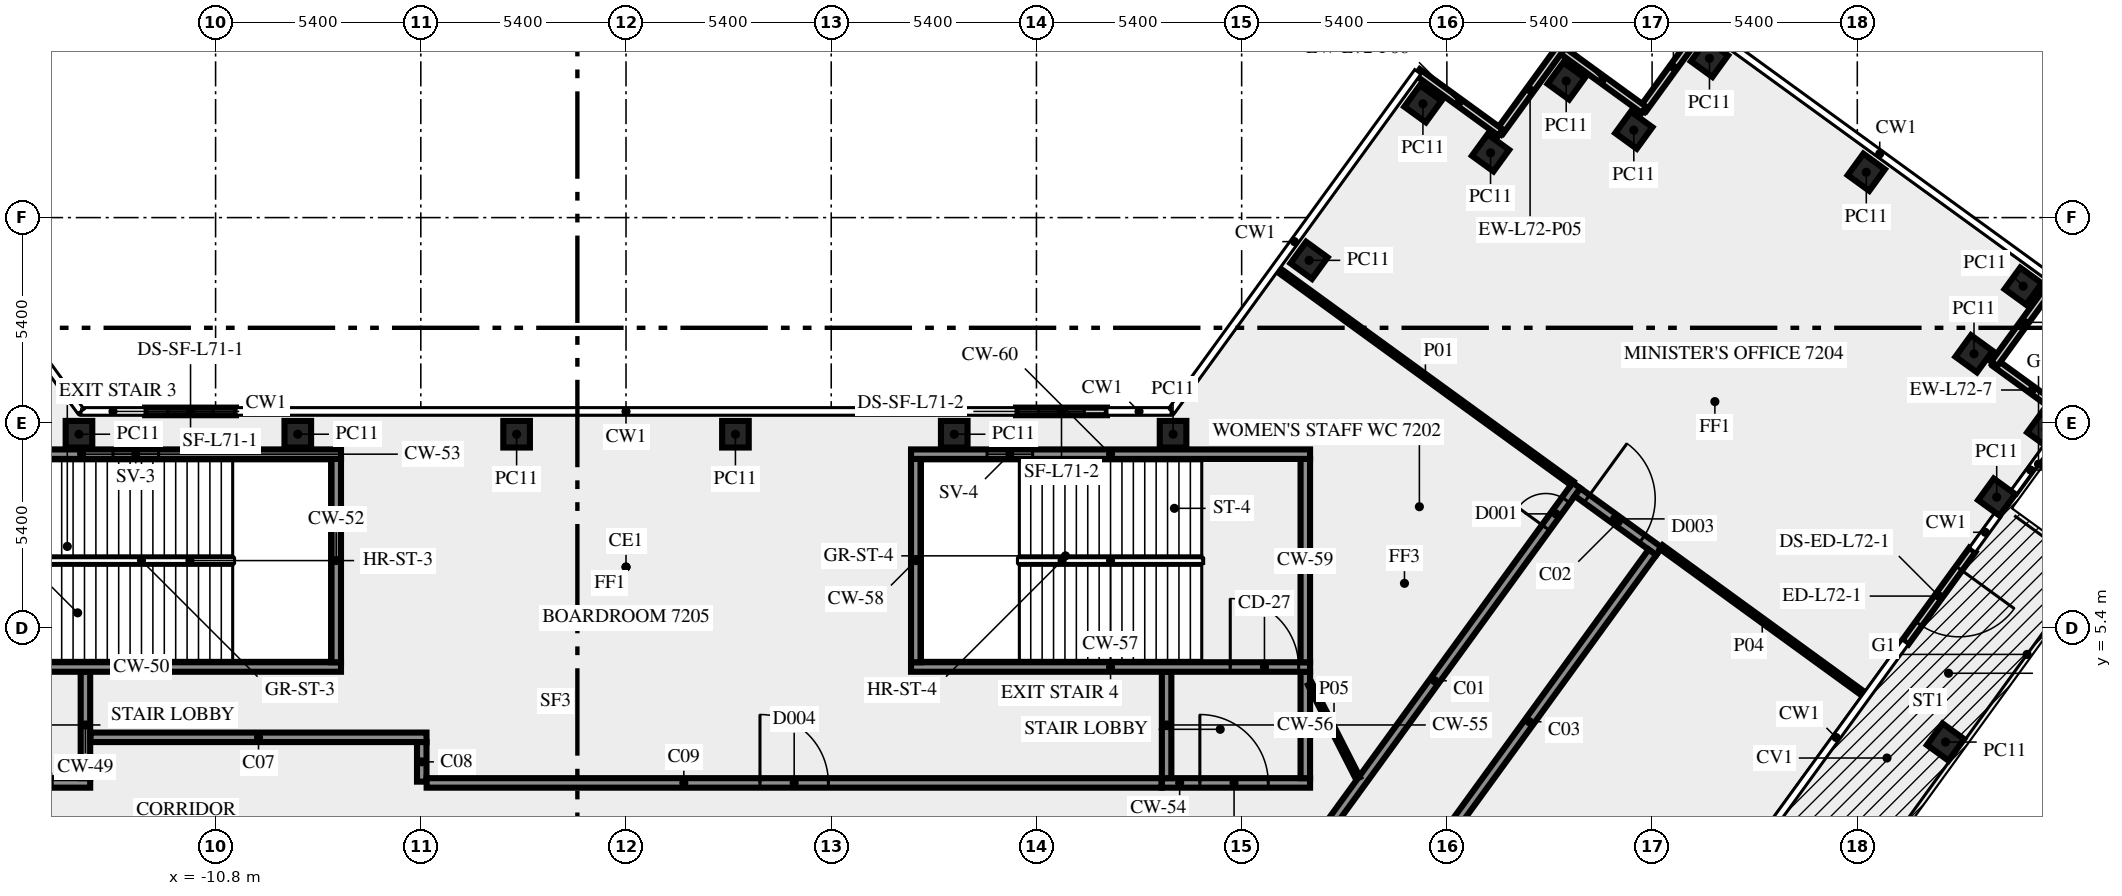
"""IFC4 building model, lengths in metres.
Left out: names, types, materials, properties, quantities, classifications, styles, units other than length and angle.
Written with IfcOpenShell. Run it as: python <this file> out.ifc"""

import sys

from ifc_helpers import new_model, si_unit, direction, frame, frame_2d, origin, origin_2d, place, context, subcontext, project, spatial, rectangle, extrude, element, fill, save


model = new_model("IFC4")
c1 = context("Model", 3, precision=1e-05, world=origin(), true_north=direction((0.0, 1.0)))
c2 = subcontext(c1, "Body", "Model", "MODEL_VIEW")
j1 = project(units=[si_unit("LENGTHUNIT", "METRE"), si_unit("PLANEANGLEUNIT", "RADIAN")], contexts=[c1])
p1 = place(None, origin())
s1 = spatial("IfcSite", under=j1, at=p1, CompositionType="ELEMENT")
p2 = place(p1, origin())
s2 = spatial("IfcBuilding", under=s1, at=p2, CompositionType="ELEMENT")
p3 = place(p2, frame((0.0, 0.0, 311.0)))
s3 = spatial("IfcBuildingStorey", under=s2, at=p3, CompositionType="ELEMENT", Elevation=311.0)
for number, where, z_axis, x_axis in (
    (1, (34.722, 2.4, 0.0), (0.0, 0.0, 1.0), (0.588, 0.809, 0.0)),
    (2, (36.068, 8.844, 0.0), (0.0, 0.0, 1.0), (0.588, 0.809, 0.0)),
    (3, (37.36, 10.625, 0.0), (0.0, 0.0, 1.0), (0.588, 0.809, 0.0)),
    (4, (35.471, 12.616, 0.0), (0.0, 0.0, 1.0), (-0.809, 0.588, 0.0)),
    (5, (36.765, 14.395, 0.0), (0.0, 0.0, 1.0), (-0.809, 0.588, 0.0)),
    (6, (32.637, 17.393, 0.0), (0.0, 0.0, 1.0), (-0.809, 0.588, 0.0)),
    (7, (28.51, 20.39, 0.0), (0.0, 0.0, 1.0), (-0.588, -0.809, 0.0)),
    (8, (26.519, 18.5, 0.0), (0.0, 0.0, 1.0), (-0.809, 0.588, 0.0)),
    (9, (24.74, 19.795, 0.0), (0.0, 0.0, 1.0), (-0.588, -0.809, 0.0)),
    (10, (22.749, 17.904, 0.0), (0.0, 0.0, 1.0), (-0.588, -0.809, 0.0)),
    (11, (20.97, 19.195, 0.0), (0.0, 0.0, 1.0), (-0.588, -0.809, 0.0)),
    (12, (17.974, 15.075, 0.0), (0.0, 0.0, 1.0), (-0.588, -0.809, 0.0)),
    (13, (14.395, 10.5, 0.0), (0.0, 0.0, 1.0), (-1.0, 0.0, 0.0)),
    (14, (8.637, 10.5, 0.0), (0.0, 0.0, 1.0), (-1.0, 0.0, 0.0)),
    (15, (2.879, 10.5, 0.0), (0.0, 0.0, 1.0), (-1.0, 0.0, 0.0)),
    (16, (-2.879, 10.5, 0.0), (0.0, 0.0, 1.0), (-1.0, 0.0, 0.0)),
    (17, (-8.637, 10.5, 0.0), (0.0, 0.0, 1.0), (-1.0, 0.0, 0.0)),
    (18, (-14.395, 10.5, 0.0), (0.0, 0.0, 1.0), (-1.0, 0.0, 0.0)),
):
    element("IfcColumn", number, at=place(p3, frame(where, z_axis=z_axis, x_axis=x_axis)), inside=s3, PredefinedType="COLUMN", context=c2, shape_type="SweptSolid", body=[
        extrude(rectangle(XDim=0.7, YDim=0.7, at=origin_2d()), origin(), (0.0, 0.0, 1.0), 3.65),
    ])
p4 = place(p3, frame((35.428, 7.455, 0.0), z_axis=(0.0, 0.0, 1.0), x_axis=(-0.587755461469, -0.809038637837, 0.0)))
e19 = element("IfcWall", 19, at=p4, inside=s3, PredefinedType="SOLIDWALL", context=c2, shape_type="SweptSolid", body=[
    extrude(rectangle(XDim=3.0, YDim=0.2, at=frame_2d((1.5, 0.0))), origin(), (0.0, 0.0, 1.0), 3.65),
])
p5 = place(p4, frame((0.6, 0.0, 0.0)))
e20 = element("IfcOpeningElement", 20, at=p5, cuts=e19, PredefinedType="OPENING", context=c2, shape_type="SweptSolid", body=[
    extrude(rectangle(XDim=1.8, YDim=2.4, at=frame_2d((0.9, 1.2))), frame((0.0, 0.11, 0.0), z_axis=(0.0, -1.0, 0.0), x_axis=(1.0, 0.0, 0.0)), (0.0, 0.0, 1.0), 0.22),
])
p6 = place(p3, frame((37.974, 10.958, 0.0), z_axis=(0.0, 0.0, 1.0), x_axis=(-0.809026317077, 0.587772420479, 0.0)))
e21 = element("IfcWall", 21, at=p6, inside=s3, PredefinedType="SOLIDWALL", context=c2, shape_type="SweptSolid", body=[
    extrude(rectangle(XDim=2.4, YDim=0.2, at=frame_2d((1.2, 0.0))), origin(), (0.0, 0.0, 1.0), 3.65),
])
p7 = place(p3, frame((36.005, 12.352, 0.0), z_axis=(0.0, 0.0, 1.0), x_axis=(0.587762999008, 0.809033161865, 0.0)))
e22 = element("IfcWall", 22, at=p7, inside=s3, PredefinedType="SOLIDWALL", context=c2, shape_type="SweptSolid", body=[
    extrude(rectangle(XDim=2.7, YDim=0.2, at=frame_2d((1.35, 0.0))), origin(), (0.0, 0.0, 1.0), 3.65),
])
for number, where, z_axis, x_axis in (
    (23, (28.354, 21.247, 0.0), (0.0, 0.0, 1.0), (-0.588, -0.809, 0.0)),
    (24, (26.785, 19.036, 0.0), (0.0, 0.0, 1.0), (-0.809, 0.588, 0.0)),
):
    element("IfcWall", number, at=place(p3, frame(where, z_axis=z_axis, x_axis=x_axis)), inside=s3, PredefinedType="SOLIDWALL", context=c2, shape_type="SweptSolid", body=[
        extrude(rectangle(XDim=2.7, YDim=0.2, at=frame_2d((1.35, 0.0))), origin(), (0.0, 0.0, 1.0), 3.65),
    ])
for number, where, z_axis, x_axis in (
    (25, (24.583, 20.65, 0.0), (0.0, 0.0, 1.0), (-0.588, -0.809, 0.0)),
    (26, (23.013, 18.438, 0.0), (0.0, 0.0, 1.0), (-0.809, 0.588, 0.0)),
):
    element("IfcWall", number, at=place(p3, frame(where, z_axis=z_axis, x_axis=x_axis)), inside=s3, PredefinedType="SOLIDWALL", context=c2, shape_type="SweptSolid", body=[
        extrude(rectangle(XDim=2.7, YDim=0.2, at=frame_2d((1.35, 0.0))), origin(), (0.0, 0.0, 1.0), 3.65),
    ])
p8 = place(p3, frame((12.655, 11.1, 0.0), z_axis=(0.0, 0.0, 1.0), x_axis=(-1.0, 0.0, 0.0)))
e27 = element("IfcWall", 27, at=p8, inside=s3, PredefinedType="SOLIDWALL", context=c2, shape_type="SweptSolid", body=[
    extrude(rectangle(XDim=2.392, YDim=0.2, at=frame_2d((1.196, 0.0))), origin(), (0.0, 0.0, 1.0), 3.65),
])
p9 = place(p8, frame((0.596, 0.0, 1.0)))
e28 = element("IfcOpeningElement", 28, at=p9, cuts=e27, PredefinedType="OPENING", context=c2, shape_type="SweptSolid", body=[
    extrude(rectangle(XDim=1.2, YDim=1.2, at=frame_2d((0.6, 0.6))), frame((0.0, 0.11, 0.0), z_axis=(0.0, -1.0, 0.0), x_axis=(1.0, 0.0, 0.0)), (0.0, 0.0, 1.0), 0.22),
])
p10 = place(p3, frame((-10.263, 11.1, 0.0), z_axis=(0.0, 0.0, 1.0), x_axis=(-1.0, 0.0, 0.0)))
e29 = element("IfcWall", 29, at=p10, inside=s3, PredefinedType="SOLIDWALL", context=c2, shape_type="SweptSolid", body=[
    extrude(rectangle(XDim=2.392, YDim=0.2, at=frame_2d((1.196, 0.0))), origin(), (0.0, 0.0, 1.0), 3.65),
])
p11 = place(p10, frame((0.596, 0.0, 1.0)))
e30 = element("IfcOpeningElement", 30, at=p11, cuts=e29, PredefinedType="OPENING", context=c2, shape_type="SweptSolid", body=[
    extrude(rectangle(XDim=1.2, YDim=1.2, at=frame_2d((0.6, 0.6))), frame((0.0, 0.11, 0.0), z_axis=(0.0, -1.0, 0.0), x_axis=(1.0, 0.0, 0.0)), (0.0, 0.0, 1.0), 0.22),
])
p12 = place(p3, frame((-18.0, 1.325, 0.0), z_axis=(0.0, 0.0, 1.0), x_axis=(1.0, 0.0, 0.0)))
e31 = element("IfcWall", 31, at=p12, inside=s3, PredefinedType="SHEAR", context=c2, shape_type="SweptSolid", body=[
    extrude(rectangle(XDim=3.9, YDim=0.25, at=frame_2d((1.95, 0.0))), origin(), (0.0, 0.0, 1.0), 3.65),
])
p13 = place(p12, frame((1.1, 0.0, 0.0)))
e32 = element("IfcOpeningElement", 32, at=p13, cuts=e31, PredefinedType="OPENING", context=c2, shape_type="SweptSolid", body=[
    extrude(rectangle(XDim=1.8, YDim=2.1, at=frame_2d((0.9, 1.05))), frame((0.0, 0.135, 0.0), z_axis=(0.0, -1.0, 0.0), x_axis=(1.0, 0.0, 0.0)), (0.0, 0.0, 1.0), 0.27),
])
p14 = place(p3, frame((-14.225, 1.45, 0.0), z_axis=(0.0, 0.0, 1.0), x_axis=(0.0, 1.0, 0.0)))
e33 = element("IfcWall", 33, at=p14, inside=s3, PredefinedType="SHEAR", context=c2, shape_type="SweptSolid", body=[
    extrude(rectangle(XDim=2.8, YDim=0.25, at=frame_2d((1.4, 0.0))), origin(), (0.0, 0.0, 1.0), 3.65),
])
p15 = place(p3, frame((-18.0, 4.375, 0.0), z_axis=(0.0, 0.0, 1.0), x_axis=(1.0, 0.0, 0.0)))
e34 = element("IfcWall", 34, at=p15, inside=s3, PredefinedType="SHEAR", context=c2, shape_type="SweptSolid", body=[
    extrude(rectangle(XDim=10.5, YDim=0.25, at=frame_2d((5.25, 0.0))), origin(), (0.0, 0.0, 1.0), 3.65),
])
p16 = place(p15, frame((0.3, 0.0, 0.0)))
e35 = element("IfcOpeningElement", 35, at=p16, cuts=e34, PredefinedType="OPENING", context=c2, shape_type="SweptSolid", body=[
    extrude(rectangle(XDim=1.8, YDim=2.1, at=frame_2d((0.9, 1.05))), frame((0.0, 0.135, 0.0), z_axis=(0.0, -1.0, 0.0), x_axis=(1.0, 0.0, 0.0)), (0.0, 0.0, 1.0), 0.27),
])
p17 = place(p3, frame((-7.625, 4.5, 0.0), z_axis=(0.0, 0.0, 1.0), x_axis=(0.0, 1.0, 0.0)))
e36 = element("IfcWall", 36, at=p17, inside=s3, PredefinedType="SHEAR", context=c2, shape_type="SweptSolid", body=[
    extrude(rectangle(XDim=5.35, YDim=0.25, at=frame_2d((2.675, 0.0))), origin(), (0.0, 0.0, 1.0), 3.65),
])
p18 = place(p3, frame((-18.0, 9.975, 0.0), z_axis=(0.0, 0.0, 1.0), x_axis=(1.0, 0.0, 0.0)))
e37 = element("IfcWall", 37, at=p18, inside=s3, PredefinedType="SHEAR", context=c2, shape_type="SweptSolid", body=[
    extrude(rectangle(XDim=10.5, YDim=0.25, at=frame_2d((5.25, 0.0))), origin(), (0.0, 0.0, 1.0), 3.65),
])
p19 = place(p18, frame((4.5, 0.0, 1.0)))
e38 = element("IfcOpeningElement", 38, at=p19, cuts=e37, PredefinedType="OPENING", context=c2, shape_type="SweptSolid", body=[
    extrude(rectangle(XDim=1.2, YDim=1.2, at=frame_2d((0.6, 0.6))), frame((0.0, 0.135, 0.0), z_axis=(0.0, -1.0, 0.0), x_axis=(1.0, 0.0, 0.0)), (0.0, 0.0, 1.0), 0.27),
])
p20 = place(p3, frame((14.1, 1.325, 0.0), z_axis=(0.0, 0.0, 1.0), x_axis=(1.0, 0.0, 0.0)))
e39 = element("IfcWall", 39, at=p20, inside=s3, PredefinedType="SHEAR", context=c2, shape_type="SweptSolid", body=[
    extrude(rectangle(XDim=3.9, YDim=0.25, at=frame_2d((1.95, 0.0))), origin(), (0.0, 0.0, 1.0), 3.65),
])
p21 = place(p20, frame((1.0, 0.0, 0.0)))
e40 = element("IfcOpeningElement", 40, at=p21, cuts=e39, PredefinedType="OPENING", context=c2, shape_type="SweptSolid", body=[
    extrude(rectangle(XDim=1.8, YDim=2.1, at=frame_2d((0.9, 1.05))), frame((0.0, 0.135, 0.0), z_axis=(0.0, -1.0, 0.0), x_axis=(1.0, 0.0, 0.0)), (0.0, 0.0, 1.0), 0.27),
])
for number, where, z_axis, x_axis in (
    (41, (14.225, 1.45, 0.0), (0.0, 0.0, 1.0), (0.0, 1.0, 0.0)),
    (42, (17.875, 1.45, 0.0), (0.0, 0.0, 1.0), (0.0, 1.0, 0.0)),
):
    element("IfcWall", number, at=place(p3, frame(where, z_axis=z_axis, x_axis=x_axis)), inside=s3, PredefinedType="SHEAR", context=c2, shape_type="SweptSolid", body=[
        extrude(rectangle(XDim=2.8, YDim=0.25, at=frame_2d((1.4, 0.0))), origin(), (0.0, 0.0, 1.0), 3.65),
    ])
p22 = place(p3, frame((7.5, 4.375, 0.0), z_axis=(0.0, 0.0, 1.0), x_axis=(1.0, 0.0, 0.0)))
e43 = element("IfcWall", 43, at=p22, inside=s3, PredefinedType="SHEAR", context=c2, shape_type="SweptSolid", body=[
    extrude(rectangle(XDim=10.5, YDim=0.25, at=frame_2d((5.25, 0.0))), origin(), (0.0, 0.0, 1.0), 3.65),
])
p23 = place(p22, frame((8.4, 0.0, 0.0)))
e44 = element("IfcOpeningElement", 44, at=p23, cuts=e43, PredefinedType="OPENING", context=c2, shape_type="SweptSolid", body=[
    extrude(rectangle(XDim=1.8, YDim=2.1, at=frame_2d((0.9, 1.05))), frame((0.0, 0.135, 0.0), z_axis=(0.0, -1.0, 0.0), x_axis=(1.0, 0.0, 0.0)), (0.0, 0.0, 1.0), 0.27),
])
for number, where, z_axis, x_axis in (
    (45, (7.625, 4.5, 0.0), (0.0, 0.0, 1.0), (0.0, 1.0, 0.0)),
    (46, (17.875, 4.5, 0.0), (0.0, 0.0, 1.0), (0.0, 1.0, 0.0)),
):
    element("IfcWall", number, at=place(p3, frame(where, z_axis=z_axis, x_axis=x_axis)), inside=s3, PredefinedType="SHEAR", context=c2, shape_type="SweptSolid", body=[
        extrude(rectangle(XDim=5.35, YDim=0.25, at=frame_2d((2.675, 0.0))), origin(), (0.0, 0.0, 1.0), 3.65),
    ])
p24 = place(p3, frame((7.5, 9.975, 0.0), z_axis=(0.0, 0.0, 1.0), x_axis=(1.0, 0.0, 0.0)))
e47 = element("IfcWall", 47, at=p24, inside=s3, PredefinedType="SHEAR", context=c2, shape_type="SweptSolid", body=[
    extrude(rectangle(XDim=10.5, YDim=0.25, at=frame_2d((5.25, 0.0))), origin(), (0.0, 0.0, 1.0), 3.65),
])
p25 = place(p24, frame((2.0, 0.0, 1.0)))
e48 = element("IfcOpeningElement", 48, at=p25, cuts=e47, PredefinedType="OPENING", context=c2, shape_type="SweptSolid", body=[
    extrude(rectangle(XDim=1.2, YDim=1.2, at=frame_2d((0.6, 0.6))), frame((0.0, 0.135, 0.0), z_axis=(0.0, -1.0, 0.0), x_axis=(1.0, 0.0, 0.0)), (0.0, 0.0, 1.0), 0.27),
])
p26 = place(p3, frame((17.545, -1.125, 0.0), z_axis=(0.0, 0.0, 1.0), x_axis=(0.587796810203, 0.809008596935, 0.0)))
e49 = element("IfcWall", 49, at=p26, inside=s3, PredefinedType="SOLIDWALL", context=c2, shape_type="SweptSolid", body=[
    extrude(rectangle(XDim=12.703, YDim=0.25, at=frame_2d((6.352, 0.0))), origin(), (0.0, 0.0, 1.0), 3.65),
])
p27 = place(p26, frame((11.329, 0.0, 0.0)))
e50 = element("IfcOpeningElement", 50, at=p27, cuts=e49, PredefinedType="OPENING", context=c2, shape_type="SweptSolid", body=[
    extrude(rectangle(XDim=0.9, YDim=2.1, at=frame_2d((0.45, 1.05))), frame((0.0, 0.135, 0.0), z_axis=(0.0, -1.0, 0.0), x_axis=(1.0, 0.0, 0.0)), (0.0, 0.0, 1.0), 0.27),
])
p28 = place(p3, frame((25.039, 8.978, 0.0), z_axis=(0.0, 0.0, 1.0), x_axis=(0.809006914995, -0.587799125119, 0.0)))
e51 = element("IfcWall", 51, at=p28, inside=s3, PredefinedType="SOLIDWALL", context=c2, shape_type="SweptSolid", body=[
    extrude(rectangle(XDim=2.65, YDim=0.25, at=frame_2d((1.325, 0.0))), origin(), (0.0, 0.0, 1.0), 3.65),
])
p29 = place(p28, frame((0.301, 0.0, 0.0)))
e52 = element("IfcOpeningElement", 52, at=p29, cuts=e51, PredefinedType="OPENING", context=c2, shape_type="SweptSolid", body=[
    extrude(rectangle(XDim=1.8, YDim=2.1, at=frame_2d((0.9, 1.05))), frame((0.0, 0.135, 0.0), z_axis=(0.0, -1.0, 0.0), x_axis=(1.0, 0.0, 0.0)), (0.0, 0.0, 1.0), 0.27),
])
p30 = place(p3, frame((27.009, 7.392, 0.0), z_axis=(0.0, 0.0, 1.0), x_axis=(-0.587776457057, -0.809023384414, 0.0)))
e53 = element("IfcWall", 53, at=p30, inside=s3, PredefinedType="SOLIDWALL", context=c2, shape_type="SweptSolid", body=[
    extrude(rectangle(XDim=11.021, YDim=0.25, at=frame_2d((5.51, 0.0))), origin(), (0.0, 0.0, 1.0), 3.65),
])
p31 = place(p30, frame((9.588, 0.0, 0.0)))
e54 = element("IfcOpeningElement", 54, at=p31, cuts=e53, PredefinedType="OPENING", context=c2, shape_type="SweptSolid", body=[
    extrude(rectangle(XDim=0.9, YDim=2.1, at=frame_2d((0.45, 1.05))), frame((0.0, 0.135, 0.0), z_axis=(0.0, -1.0, 0.0), x_axis=(1.0, 0.0, 0.0)), (0.0, 0.0, 1.0), 0.27),
])
p32 = place(p3, frame((-14.09, 2.525, 0.0), z_axis=(0.0, 0.0, 1.0), x_axis=(1.0, 0.0, 0.0)))
e55 = element("IfcWall", 55, at=p32, inside=s3, PredefinedType="SOLIDWALL", context=c2, shape_type="SweptSolid", body=[
    extrude(rectangle(XDim=8.84, YDim=0.25, at=frame_2d((4.42, 0.0))), origin(), (0.0, 0.0, 1.0), 3.65),
])
p33 = place(p3, frame((-5.375, 2.4, 0.0), z_axis=(0.0, 0.0, 1.0), x_axis=(0.0, -1.0, 0.0)))
e56 = element("IfcWall", 56, at=p33, inside=s3, PredefinedType="SOLIDWALL", context=c2, shape_type="SweptSolid", body=[
    extrude(rectangle(XDim=1.041, YDim=0.25, at=frame_2d((0.521, 0.0))), origin(), (0.0, 0.0, 1.0), 3.65),
])
p34 = place(p3, frame((-5.246, 1.325, 0.0), z_axis=(0.0, 0.0, 1.0), x_axis=(1.0, 0.0, 0.0)))
e57 = element("IfcWall", 57, at=p34, inside=s3, PredefinedType="SOLIDWALL", context=c2, shape_type="SweptSolid", body=[
    extrude(rectangle(XDim=19.336, YDim=0.25, at=frame_2d((9.668, 0.0))), origin(), (0.0, 0.0, 1.0), 3.65),
])
p35 = place(p34, frame((8.771, 0.0, 0.0)))
e58 = element("IfcOpeningElement", 58, at=p35, cuts=e57, PredefinedType="OPENING", context=c2, shape_type="SweptSolid", body=[
    extrude(rectangle(XDim=1.8, YDim=2.1, at=frame_2d((0.9, 1.05))), frame((0.0, 0.135, 0.0), z_axis=(0.0, -1.0, 0.0), x_axis=(1.0, 0.0, 0.0)), (0.0, 0.0, 1.0), 0.27),
])
p36 = place(p3, frame((24.898, 9.21, 0.0), z_axis=(0.0, 0.0, 1.0), x_axis=(-0.809046636998, 0.587744450559, 0.0)))
e59 = element("IfcWall", 59, at=p36, inside=s3, PredefinedType="PARTITIONING", context=c2, shape_type="SweptSolid", body=[
    extrude(rectangle(XDim=9.549, YDim=0.12, at=frame_2d((4.775, 0.0))), origin(), (0.0, 0.0, 1.0), 2.95),
])
p37 = place(p3, frame((27.241, 7.533, 0.0), z_axis=(0.0, 0.0, 1.0), x_axis=(0.809057351259, -0.587729701796, 0.0)))
e60 = element("IfcWall", 60, at=p37, inside=s3, PredefinedType="PARTITIONING", context=c2, shape_type="SweptSolid", body=[
    extrude(rectangle(XDim=6.57, YDim=0.12, at=frame_2d((3.285, 0.0))), origin(), (0.0, 0.0, 1.0), 3.65),
])
p38 = place(p3, frame((18.0, 3.925, 0.0), z_axis=(0.0, 0.0, 1.0), x_axis=(0.453950796792, -0.891026752736, 0.0)))
e61 = element("IfcWall", 61, at=p38, inside=s3, PredefinedType="PARTITIONING", context=c2, shape_type="SweptSolid", body=[
    extrude(rectangle(XDim=2.778, YDim=0.12, at=frame_2d((1.389, 0.0))), origin(), (0.0, 0.0, 1.0), 3.65),
])
p39 = place(p5, origin())
e62 = element("IfcDoor", 62, at=p39, inside=s3, OperationType="DOUBLE_DOOR_SINGLE_SWING", PredefinedType="DOOR", context=c2, shape_type="SweptSolid", body=[
    extrude(rectangle(XDim=1.8, YDim=2.4, at=frame_2d((0.9, 1.2))), frame((0.0, 0.025, 0.0), z_axis=(0.0, -1.0, 0.0), x_axis=(1.0, 0.0, 0.0)), (0.0, 0.0, 1.0), 0.05),
])
fill(e20, e62)
p40 = place(p9, origin())
e63 = element("IfcWindow", 63, at=p40, inside=s3, PartitioningType="SINGLE_PANEL", PredefinedType="WINDOW", context=c2, shape_type="SweptSolid", body=[
    extrude(rectangle(XDim=1.2, YDim=1.2, at=frame_2d((0.6, 0.6))), frame((0.0, 0.03, 0.0), z_axis=(0.0, -1.0, 0.0), x_axis=(1.0, 0.0, 0.0)), (0.0, 0.0, 1.0), 0.06),
])
fill(e28, e63)
p41 = place(p11, origin())
e64 = element("IfcWindow", 64, at=p41, inside=s3, PartitioningType="SINGLE_PANEL", PredefinedType="WINDOW", context=c2, shape_type="SweptSolid", body=[
    extrude(rectangle(XDim=1.2, YDim=1.2, at=frame_2d((0.6, 0.6))), frame((0.0, 0.03, 0.0), z_axis=(0.0, -1.0, 0.0), x_axis=(1.0, 0.0, 0.0)), (0.0, 0.0, 1.0), 0.06),
])
fill(e30, e64)
p42 = place(p13, origin())
e65 = element("IfcDoor", 65, at=p42, inside=s3, OperationType="DOUBLE_DOOR_SINGLE_SWING", PredefinedType="DOOR", context=c2, shape_type="SweptSolid", body=[
    extrude(rectangle(XDim=1.8, YDim=2.1, at=frame_2d((0.9, 1.05))), frame((0.0, 0.025, 0.0), z_axis=(0.0, -1.0, 0.0), x_axis=(1.0, 0.0, 0.0)), (0.0, 0.0, 1.0), 0.05),
])
fill(e32, e65)
p43 = place(p19, origin())
e66 = element("IfcWindow", 66, at=p43, inside=s3, PartitioningType="SINGLE_PANEL", PredefinedType="WINDOW", context=c2, shape_type="SweptSolid", body=[
    extrude(rectangle(XDim=1.2, YDim=1.2, at=frame_2d((0.6, 0.6))), frame((0.0, 0.03, 0.0), z_axis=(0.0, -1.0, 0.0), x_axis=(1.0, 0.0, 0.0)), (0.0, 0.0, 1.0), 0.06),
])
fill(e38, e66)
p44 = place(p21, origin())
e67 = element("IfcDoor", 67, at=p44, inside=s3, OperationType="DOUBLE_DOOR_SINGLE_SWING", PredefinedType="DOOR", context=c2, shape_type="SweptSolid", body=[
    extrude(rectangle(XDim=1.8, YDim=2.1, at=frame_2d((0.9, 1.05))), frame((0.0, 0.025, 0.0), z_axis=(0.0, -1.0, 0.0), x_axis=(1.0, 0.0, 0.0)), (0.0, 0.0, 1.0), 0.05),
])
fill(e40, e67)
p45 = place(p23, origin())
e68 = element("IfcDoor", 68, at=p45, inside=s3, OperationType="DOUBLE_DOOR_SINGLE_SWING", PredefinedType="DOOR", context=c2, shape_type="SweptSolid", body=[
    extrude(rectangle(XDim=1.8, YDim=2.1, at=frame_2d((0.9, 1.05))), frame((0.0, 0.025, 0.0), z_axis=(0.0, -1.0, 0.0), x_axis=(1.0, 0.0, 0.0)), (0.0, 0.0, 1.0), 0.05),
])
fill(e44, e68)
p46 = place(p25, origin())
e69 = element("IfcWindow", 69, at=p46, inside=s3, PartitioningType="SINGLE_PANEL", PredefinedType="WINDOW", context=c2, shape_type="SweptSolid", body=[
    extrude(rectangle(XDim=1.2, YDim=1.2, at=frame_2d((0.6, 0.6))), frame((0.0, 0.03, 0.0), z_axis=(0.0, -1.0, 0.0), x_axis=(1.0, 0.0, 0.0)), (0.0, 0.0, 1.0), 0.06),
])
fill(e48, e69)
p47 = place(p35, origin())
e70 = element("IfcDoor", 70, at=p47, inside=s3, OperationType="DOUBLE_DOOR_SINGLE_SWING", PredefinedType="DOOR", context=c2, shape_type="SweptSolid", body=[
    extrude(rectangle(XDim=1.8, YDim=2.1, at=frame_2d((0.9, 1.05))), frame((0.0, 0.025, 0.0), z_axis=(0.0, -1.0, 0.0), x_axis=(1.0, 0.0, 0.0)), (0.0, 0.0, 1.0), 0.05),
])
fill(e58, e70)
p48 = place(p27, origin())
e71 = element("IfcDoor", 71, at=p48, inside=s3, OperationType="SINGLE_SWING_RIGHT", PredefinedType="DOOR", context=c2, shape_type="SweptSolid", body=[
    extrude(rectangle(XDim=0.9, YDim=2.1, at=frame_2d((0.45, 1.05))), frame((0.0, 0.025, 0.0), z_axis=(0.0, -1.0, 0.0), x_axis=(1.0, 0.0, 0.0)), (0.0, 0.0, 1.0), 0.05),
])
fill(e50, e71)
p49 = place(p29, origin())
e72 = element("IfcDoor", 72, at=p49, inside=s3, OperationType="DOUBLE_DOOR_SINGLE_SWING", PredefinedType="DOOR", context=c2, shape_type="SweptSolid", body=[
    extrude(rectangle(XDim=1.8, YDim=2.1, at=frame_2d((0.9, 1.05))), frame((0.0, 0.025, 0.0), z_axis=(0.0, -1.0, 0.0), x_axis=(1.0, 0.0, 0.0)), (0.0, 0.0, 1.0), 0.05),
])
fill(e52, e72)
save(model, sys.argv[1])
